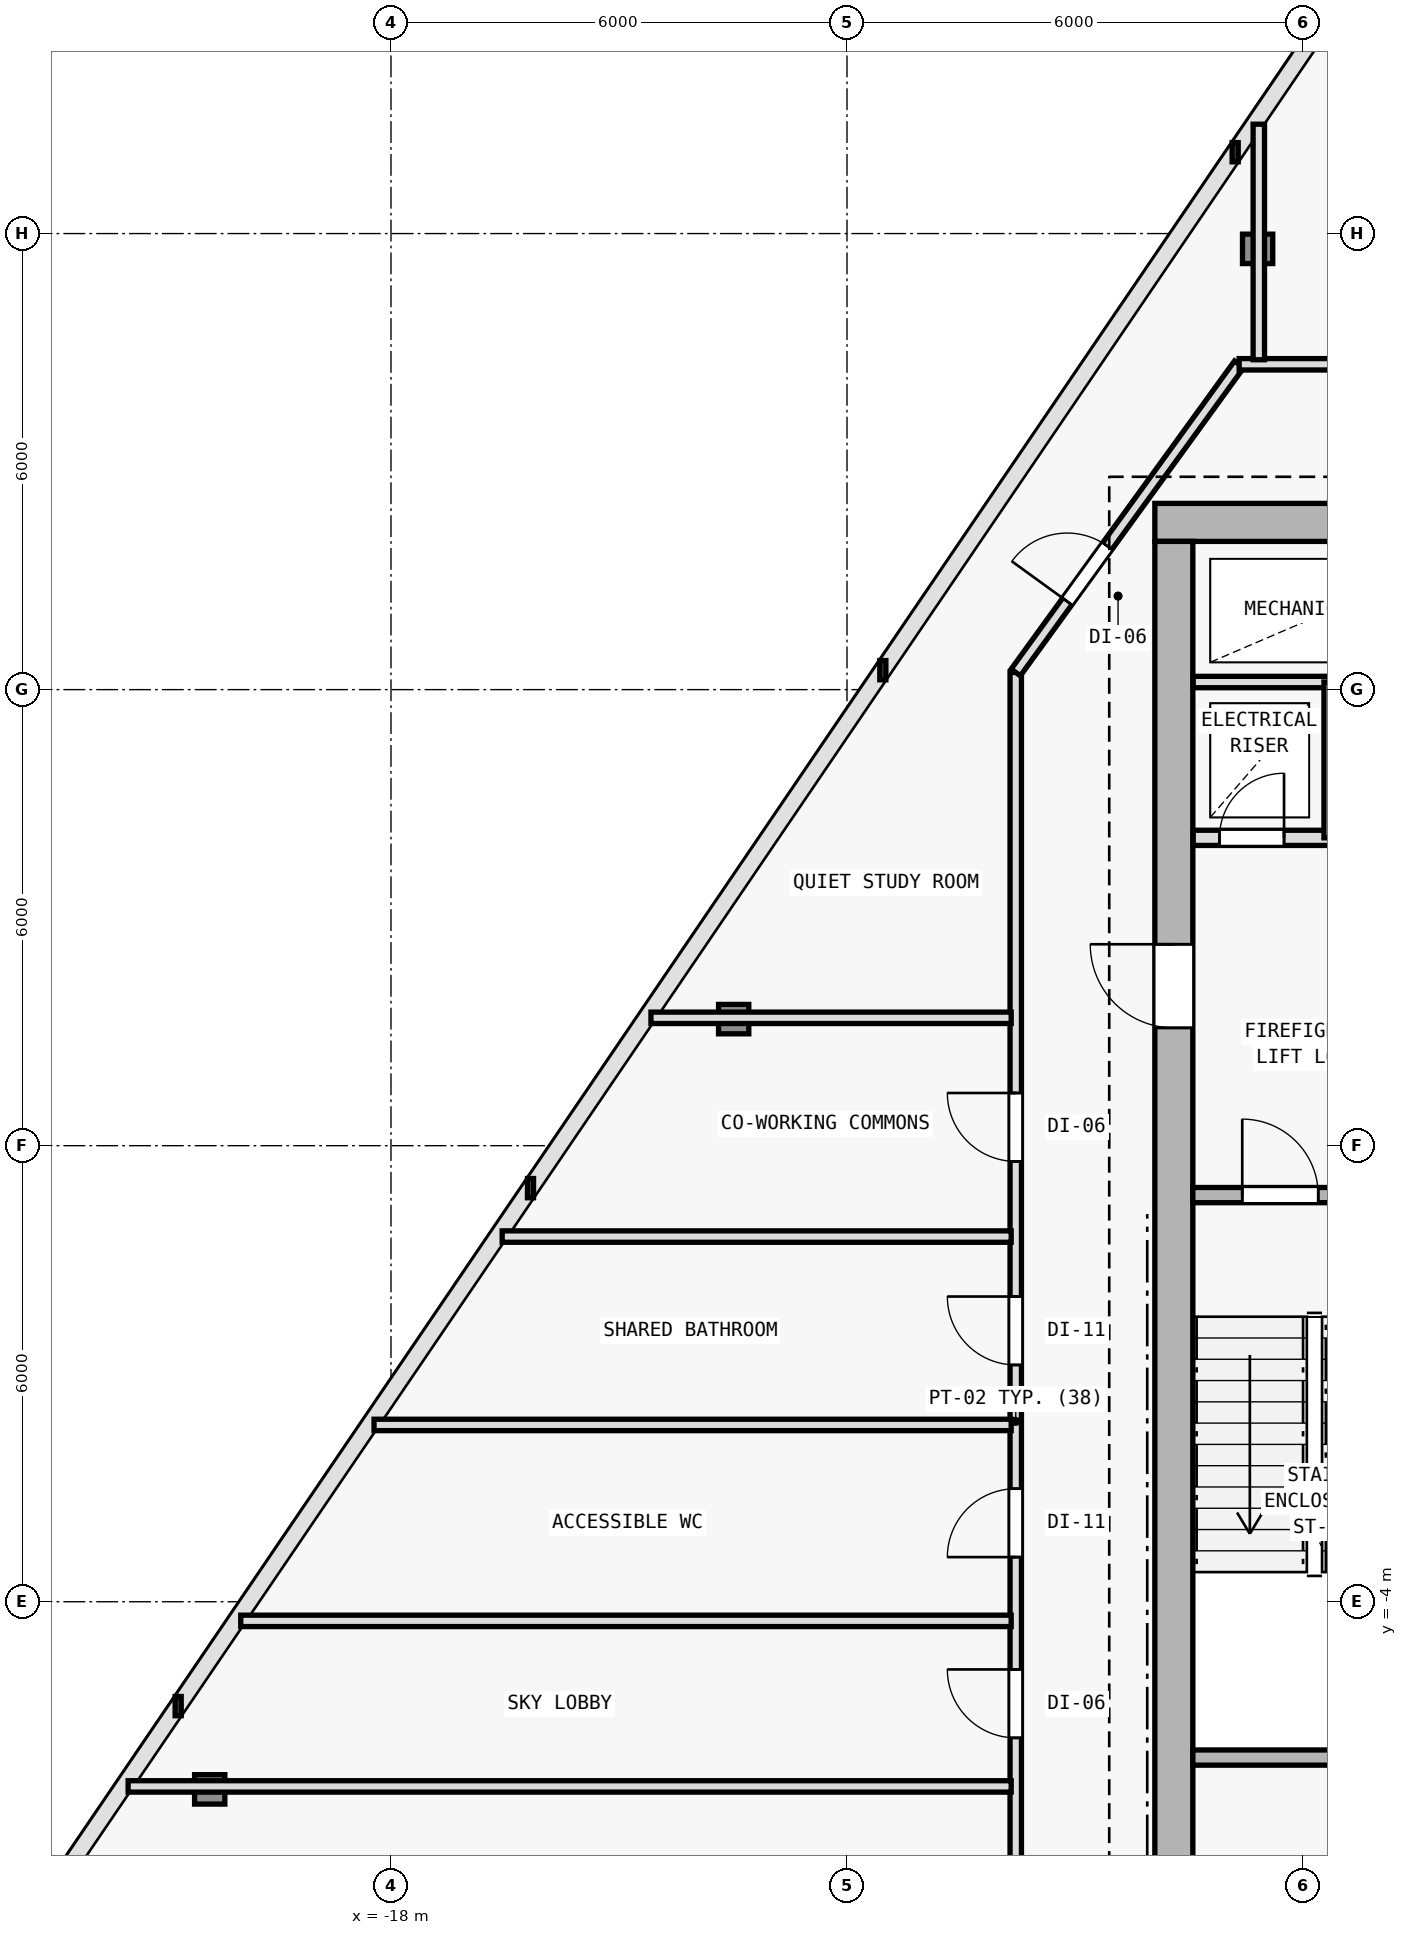
"""IFC4 building model, lengths in metres.
Left out: names, types, materials, properties, quantities, classifications, styles, units other than length and angle.
Written with IfcOpenShell. Run it as: python <this file> out.ifc"""

import sys

from ifc_helpers import new_model, si_unit, direction, frame, frame_2d, origin, origin_2d, place, context, subcontext, project, spatial, rectangle, i_section, extrude, element, fill, save


model = new_model("IFC4")
c1 = context("Model", 3, precision=1e-05, world=origin(), true_north=direction((0.0, 1.0)))
c2 = subcontext(c1, "Body", "Model", "MODEL_VIEW")
j1 = project(units=[si_unit("LENGTHUNIT", "METRE"), si_unit("PLANEANGLEUNIT", "RADIAN")], contexts=[c1])
p1 = place(None, origin())
s1 = spatial("IfcSite", under=j1, at=p1, CompositionType="ELEMENT")
p2 = place(p1, origin())
s2 = spatial("IfcBuilding", under=s1, at=p2, CompositionType="ELEMENT")
p3 = place(p2, frame((0.0, 0.0, 190.2)))
s3 = spatial("IfcBuildingStorey", under=s2, at=p3, CompositionType="ELEMENT", Elevation=190.2)
for number, where, z_axis, x_axis in (
    (1, (-7.7, 10.2, 0.0), (0.0, 0.0, 1.0), (1.0, 0.0, 0.0)),
    (2, (-7.7, 2.0, 0.0), (0.0, 0.0, 1.0), (1.0, 0.0, 0.0)),
):
    element("IfcColumn", number, at=place(p3, frame(where, z_axis=z_axis, x_axis=x_axis)), inside=s3, PredefinedType="COLUMN", context=c2, shape_type="SweptSolid", body=[
        extrude(i_section(OverallWidth=0.404, OverallDepth=0.407, WebThickness=0.017, FlangeThickness=0.028, FilletRadius=0.015, at=origin_2d()), origin(), (0.0, 0.0, 1.0), 4.5),
    ])
p4 = place(p3, frame((-6.598, 13.799, 0.006), z_axis=(0.007015639536, -0.002012237696, 0.999973365496), x_axis=(0.275705143097, 0.961242255662, 0.0)))
e3 = element("IfcColumn", 3, at=p4, inside=s3, PredefinedType="COLUMN", context=c2, shape_type="SweptSolid", body=[
    extrude(i_section(OverallWidth=0.398, OverallDepth=0.387, WebThickness=0.013, FlangeThickness=0.022, FilletRadius=0.015, at=origin_2d()), origin(), (0.0, 0.0, 1.0), 4.489),
])
p5 = place(p3, frame((-13.491, 3.665, 0.006), z_axis=(0.013540536906, 0.007667532947, 0.99987892407), x_axis=(-0.492748024369, 0.870172043035, 0.0)))
e4 = element("IfcColumn", 4, at=p5, inside=s3, PredefinedType="COLUMN", context=c2, shape_type="SweptSolid", body=[
    extrude(i_section(OverallWidth=0.398, OverallDepth=0.387, WebThickness=0.013, FlangeThickness=0.022, FilletRadius=0.015, at=origin_2d()), origin(), (0.0, 0.0, 1.0), 4.49),
])
p6 = place(p3, frame((-20.385, -6.469, 0.006), z_axis=(0.020170177998, 0.017288723999, 0.999647069691), x_axis=(-0.650791373456, 0.759256602365, 0.0)))
e5 = element("IfcColumn", 5, at=p6, inside=s3, PredefinedType="COLUMN", context=c2, shape_type="SweptSolid", body=[
    extrude(i_section(OverallWidth=0.398, OverallDepth=0.387, WebThickness=0.013, FlangeThickness=0.022, FilletRadius=0.015, at=origin_2d()), origin(), (0.0, 0.0, 1.0), 4.49),
])
p7 = place(p3, frame((7.95, 10.2, 0.0), z_axis=(0.0, 0.0, 1.0), x_axis=(-1.0, 0.0, 0.0)))
e6 = element("IfcWall", 6, at=p7, inside=s3, PredefinedType="SHEAR", context=c2, shape_type="SweptSolid", body=[
    extrude(rectangle(XDim=15.9, YDim=0.5, at=frame_2d((7.95, 0.0))), origin(), (0.0, 0.0, 1.0), 4.25),
])
p8 = place(p7, frame((4.4, 0.0, 0.0)))
e7 = element("IfcOpeningElement", 7, at=p8, cuts=e6, PredefinedType="OPENING", context=c2, shape_type="SweptSolid", body=[
    extrude(rectangle(XDim=1.1, YDim=2.15, at=frame_2d((0.55, 1.075))), frame((0.0, 0.26, 0.0), z_axis=(0.0, -1.0, 0.0), x_axis=(1.0, 0.0, 0.0)), (0.0, 0.0, 1.0), 0.52),
])
p9 = place(p3, frame((-7.7, -9.15, 0.0), z_axis=(0.0, 0.0, 1.0), x_axis=(0.0, 1.0, 0.0)))
e8 = element("IfcWall", 8, at=p9, inside=s3, PredefinedType="SHEAR", context=c2, shape_type="SweptSolid", body=[
    extrude(rectangle(XDim=19.1, YDim=0.5, at=frame_2d((9.55, 0.0))), origin(), (0.0, 0.0, 1.0), 4.25),
])
p10 = place(p9, frame((12.7, 0.0, 0.0)))
e9 = element("IfcOpeningElement", 9, at=p10, cuts=e8, PredefinedType="OPENING", context=c2, shape_type="SweptSolid", body=[
    extrude(rectangle(XDim=1.1, YDim=2.15, at=frame_2d((0.55, 1.075))), frame((0.0, 0.26, 0.0), z_axis=(0.0, -1.0, 0.0), x_axis=(1.0, 0.0, 0.0)), (0.0, 0.0, 1.0), 0.52),
])
p11 = place(p3, frame((-7.45, 1.35, 0.0), z_axis=(0.0, 0.0, 1.0), x_axis=(1.0, 0.0, 0.0)))
e10 = element("IfcWall", 10, at=p11, inside=s3, PredefinedType="SOLIDWALL", context=c2, shape_type="SweptSolid", body=[
    extrude(rectangle(XDim=3.4, YDim=0.2, at=frame_2d((1.7, 0.0))), origin(), (0.0, 0.0, 1.0), 4.25),
])
p12 = place(p11, frame((0.65, 0.0, 0.0)))
e11 = element("IfcOpeningElement", 11, at=p12, cuts=e10, PredefinedType="OPENING", context=c2, shape_type="SweptSolid", body=[
    extrude(rectangle(XDim=1.0, YDim=2.15, at=frame_2d((0.5, 1.075))), frame((0.0, 0.11, 0.0), z_axis=(0.0, -1.0, 0.0), x_axis=(1.0, 0.0, 0.0)), (0.0, 0.0, 1.0), 0.22),
])
p13 = place(p3, frame((-7.445, 6.05, 0.0), z_axis=(0.0, 0.0, 1.0), x_axis=(1.0, 0.0, 0.0)))
e12 = element("IfcWall", 12, at=p13, inside=s3, PredefinedType="SOLIDWALL", context=c2, shape_type="SweptSolid", body=[
    extrude(rectangle(XDim=3.595, YDim=0.2, at=frame_2d((1.797, 0.0))), origin(), (0.0, 0.0, 1.0), 4.25),
])
p14 = place(p13, frame((0.345, 0.0, 0.0)))
e13 = element("IfcOpeningElement", 13, at=p14, cuts=e12, PredefinedType="OPENING", context=c2, shape_type="SweptSolid", body=[
    extrude(rectangle(XDim=0.85, YDim=2.1, at=frame_2d((0.425, 1.05))), frame((0.0, 0.11, 0.0), z_axis=(0.0, -1.0, 0.0), x_axis=(1.0, 0.0, 0.0)), (0.0, 0.0, 1.0), 0.22),
])
p15 = place(p13, frame((2.145, 0.0, 0.0)))
e14 = element("IfcOpeningElement", 14, at=p15, cuts=e12, PredefinedType="OPENING", context=c2, shape_type="SweptSolid", body=[
    extrude(rectangle(XDim=0.85, YDim=2.1, at=frame_2d((0.425, 1.05))), frame((0.0, 0.11, 0.0), z_axis=(0.0, -1.0, 0.0), x_axis=(1.0, 0.0, 0.0)), (0.0, 0.0, 1.0), 0.22),
])
p16 = place(p3, frame((-7.445, 8.1, 0.0), z_axis=(0.0, 0.0, 1.0), x_axis=(1.0, 0.0, 0.0)))
e15 = element("IfcWall", 15, at=p16, inside=s3, PredefinedType="PARTITIONING", context=c2, shape_type="SweptSolid", body=[
    extrude(rectangle(XDim=3.595, YDim=0.15, at=frame_2d((1.797, 0.0))), origin(), (0.0, 0.0, 1.0), 4.25),
])
p17 = place(p3, frame((-5.65, 6.05, 0.0), z_axis=(0.0, 0.0, 1.0), x_axis=(0.0, 1.0, 0.0)))
e16 = element("IfcWall", 16, at=p17, inside=s3, PredefinedType="PARTITIONING", context=c2, shape_type="SweptSolid", body=[
    extrude(rectangle(XDim=2.05, YDim=0.15, at=frame_2d((1.025, 0.0))), origin(), (0.0, 0.0, 1.0), 4.25),
])
p18 = place(p3, frame((-7.45, -6.05, 0.0), z_axis=(0.0, 0.0, 1.0), x_axis=(1.0, 0.0, 0.0)))
e17 = element("IfcWall", 17, at=p18, inside=s3, PredefinedType="SOLIDWALL", context=c2, shape_type="SweptSolid", body=[
    extrude(rectangle(XDim=3.4, YDim=0.2, at=frame_2d((1.7, 0.0))), origin(), (0.0, 0.0, 1.0), 4.25),
])
p19 = place(p3, frame((-9.78, -11.48, 0.0), z_axis=(0.0, 0.0, 1.0), x_axis=(0.0, 1.0, 0.0)))
e18 = element("IfcWall", 18, at=p19, inside=s3, PredefinedType="PARTITIONING", context=c2, shape_type="SweptSolid", body=[
    extrude(rectangle(XDim=19.706, YDim=0.15, at=frame_2d((9.853, 0.0))), origin(), (0.0, 0.0, 1.0), 3.725),
])
p20 = place(p19, frame((10.595, 0.0, 0.0)))
e19 = element("IfcOpeningElement", 19, at=p20, cuts=e18, PredefinedType="OPENING", context=c2, shape_type="SweptSolid", body=[
    extrude(rectangle(XDim=0.9, YDim=2.1, at=frame_2d((0.45, 1.05))), frame((0.0, 0.085, 0.0), z_axis=(0.0, -1.0, 0.0), x_axis=(1.0, 0.0, 0.0)), (0.0, 0.0, 1.0), 0.17),
])
p21 = place(p19, frame((8.067, 0.0, 0.0)))
e20 = element("IfcOpeningElement", 20, at=p21, cuts=e18, PredefinedType="OPENING", context=c2, shape_type="SweptSolid", body=[
    extrude(rectangle(XDim=0.9, YDim=2.1, at=frame_2d((0.45, 1.05))), frame((0.0, 0.085, 0.0), z_axis=(0.0, -1.0, 0.0), x_axis=(1.0, 0.0, 0.0)), (0.0, 0.0, 1.0), 0.17),
])
p22 = place(p19, frame((5.689, 0.0, 0.0)))
e21 = element("IfcOpeningElement", 21, at=p22, cuts=e18, PredefinedType="OPENING", context=c2, shape_type="SweptSolid", body=[
    extrude(rectangle(XDim=0.9, YDim=2.1, at=frame_2d((0.45, 1.05))), frame((0.0, 0.085, 0.0), z_axis=(0.0, -1.0, 0.0), x_axis=(1.0, 0.0, 0.0)), (0.0, 0.0, 1.0), 0.17),
])
p23 = place(p19, frame((2.164, 0.0, 0.0)))
e22 = element("IfcOpeningElement", 22, at=p23, cuts=e18, PredefinedType="OPENING", context=c2, shape_type="SweptSolid", body=[
    extrude(rectangle(XDim=0.9, YDim=2.1, at=frame_2d((0.45, 1.05))), frame((0.0, 0.085, 0.0), z_axis=(0.0, -1.0, 0.0), x_axis=(1.0, 0.0, 0.0)), (0.0, 0.0, 1.0), 0.17),
])
p24 = place(p19, frame((13.273, 0.0, 0.0)))
e23 = element("IfcOpeningElement", 23, at=p24, cuts=e18, PredefinedType="OPENING", context=c2, shape_type="SweptSolid", body=[
    extrude(rectangle(XDim=0.9, YDim=2.1, at=frame_2d((0.45, 1.05))), frame((0.0, 0.085, 0.0), z_axis=(0.0, -1.0, 0.0), x_axis=(1.0, 0.0, 0.0)), (0.0, 0.0, 1.0), 0.17),
])
p25 = place(p3, frame((-9.78, 8.226, 0.0), z_axis=(0.0, 0.0, 1.0), x_axis=(0.586956386413, 0.809618552436, 0.0)))
e24 = element("IfcWall", 24, at=p25, inside=s3, PredefinedType="PARTITIONING", context=c2, shape_type="SweptSolid", body=[
    extrude(rectangle(XDim=5.008, YDim=0.15, at=frame_2d((2.504, 0.0))), origin(), (0.0, 0.0, 1.0), 3.905),
])
p26 = place(p25, frame((1.154, 0.0, 0.0)))
e25 = element("IfcOpeningElement", 25, at=p26, cuts=e24, PredefinedType="OPENING", context=c2, shape_type="SweptSolid", body=[
    extrude(rectangle(XDim=0.9, YDim=2.1, at=frame_2d((0.45, 1.05))), frame((0.0, 0.085, 0.0), z_axis=(0.0, -1.0, 0.0), x_axis=(1.0, 0.0, 0.0)), (0.0, 0.0, 1.0), 0.17),
])
p27 = place(p3, frame((-6.841, 12.28, 0.0), z_axis=(0.0, 0.0, 1.0), x_axis=(1.0, 0.0, 0.0)))
e26 = element("IfcWall", 26, at=p27, inside=s3, PredefinedType="PARTITIONING", context=c2, shape_type="SweptSolid", body=[
    extrude(rectangle(XDim=13.682, YDim=0.15, at=frame_2d((6.841, 0.0))), origin(), (0.0, 0.0, 1.0), 3.905),
])
p28 = place(p27, frame((11.723, 0.0, 0.0)))
e27 = element("IfcOpeningElement", 27, at=p28, cuts=e26, PredefinedType="OPENING", context=c2, shape_type="SweptSolid", body=[
    extrude(rectangle(XDim=0.9, YDim=2.1, at=frame_2d((0.45, 1.05))), frame((0.0, 0.085, 0.0), z_axis=(0.0, -1.0, 0.0), x_axis=(1.0, 0.0, 0.0)), (0.0, 0.0, 1.0), 0.17),
])
p29 = place(p27, frame((8.712, 0.0, 0.0)))
e28 = element("IfcOpeningElement", 28, at=p29, cuts=e26, PredefinedType="OPENING", context=c2, shape_type="SweptSolid", body=[
    extrude(rectangle(XDim=0.9, YDim=2.1, at=frame_2d((0.45, 1.05))), frame((0.0, 0.085, 0.0), z_axis=(0.0, -1.0, 0.0), x_axis=(1.0, 0.0, 0.0)), (0.0, 0.0, 1.0), 0.17),
])
p30 = place(p27, frame((6.014, 0.0, 0.0)))
e29 = element("IfcOpeningElement", 29, at=p30, cuts=e26, PredefinedType="OPENING", context=c2, shape_type="SweptSolid", body=[
    extrude(rectangle(XDim=0.9, YDim=2.1, at=frame_2d((0.45, 1.05))), frame((0.0, 0.085, 0.0), z_axis=(0.0, -1.0, 0.0), x_axis=(1.0, 0.0, 0.0)), (0.0, 0.0, 1.0), 0.17),
])
p31 = place(p27, frame((2.403, 0.0, 0.0)))
e30 = element("IfcOpeningElement", 30, at=p31, cuts=e26, PredefinedType="OPENING", context=c2, shape_type="SweptSolid", body=[
    extrude(rectangle(XDim=0.9, YDim=2.1, at=frame_2d((0.45, 1.05))), frame((0.0, 0.085, 0.0), z_axis=(0.0, -1.0, 0.0), x_axis=(1.0, 0.0, 0.0)), (0.0, 0.0, 1.0), 0.17),
])
p32 = place(p3, frame((-6.582, 12.34, 0.0), z_axis=(0.0, 0.0, 1.0), x_axis=(0.0, 1.0, 0.0)))
e31 = element("IfcWall", 31, at=p32, inside=s3, PredefinedType="PARTITIONING", context=c2, shape_type="SweptSolid", body=[
    extrude(rectangle(XDim=3.099, YDim=0.15, at=frame_2d((1.549, 0.0))), origin(), (0.0, 0.0, 1.0), 3.835),
])
p33 = place(p3, frame((-9.84, 3.682, 0.0), z_axis=(0.0, 0.0, 1.0), x_axis=(-1.0, 0.0, 0.0)))
e32 = element("IfcWall", 32, at=p33, inside=s3, PredefinedType="PARTITIONING", context=c2, shape_type="SweptSolid", body=[
    extrude(rectangle(XDim=4.74, YDim=0.15, at=frame_2d((2.37, 0.0))), origin(), (0.0, 0.0, 1.0), 3.835),
])
p34 = place(p3, frame((-9.84, -6.43, 0.0), z_axis=(0.0, 0.0, 1.0), x_axis=(-1.0, 0.0, 0.0)))
e33 = element("IfcWall", 33, at=p34, inside=s3, PredefinedType="PARTITIONING", context=c2, shape_type="SweptSolid", body=[
    extrude(rectangle(XDim=11.618, YDim=0.15, at=frame_2d((5.809, 0.0))), origin(), (0.0, 0.0, 1.0), 3.725),
])
p35 = place(p3, frame((-9.84, -1.674, 0.0), z_axis=(0.0, 0.0, 1.0), x_axis=(-1.0, 0.0, 0.0)))
e34 = element("IfcWall", 34, at=p35, inside=s3, PredefinedType="PARTITIONING", context=c2, shape_type="SweptSolid", body=[
    extrude(rectangle(XDim=8.383, YDim=0.15, at=frame_2d((4.191, 0.0))), origin(), (0.0, 0.0, 1.0), 3.835),
])
p36 = place(p3, frame((-9.84, -4.252, 0.0), z_axis=(0.0, 0.0, 1.0), x_axis=(-1.0, 0.0, 0.0)))
e35 = element("IfcWall", 35, at=p36, inside=s3, PredefinedType="PARTITIONING", context=c2, shape_type="SweptSolid", body=[
    extrude(rectangle(XDim=10.137, YDim=0.15, at=frame_2d((5.068, 0.0))), origin(), (0.0, 0.0, 1.0), 3.835),
])
p37 = place(p3, frame((-9.84, 0.804, 0.0), z_axis=(0.0, 0.0, 1.0), x_axis=(-1.0, 0.0, 0.0)))
e36 = element("IfcWall", 36, at=p37, inside=s3, PredefinedType="PARTITIONING", context=c2, shape_type="SweptSolid", body=[
    extrude(rectangle(XDim=6.697, YDim=0.15, at=frame_2d((3.349, 0.0))), origin(), (0.0, 0.0, 1.0), 3.835),
])
p38 = place(p10, origin())
e37 = element("IfcDoor", 37, at=p38, inside=s3, OperationType="SINGLE_SWING_RIGHT", PredefinedType="DOOR", context=c2, shape_type="SweptSolid", body=[
    extrude(rectangle(XDim=1.1, YDim=2.15, at=frame_2d((0.55, 1.075))), frame((0.0, 0.025, 0.0), z_axis=(0.0, -1.0, 0.0), x_axis=(1.0, 0.0, 0.0)), (0.0, 0.0, 1.0), 0.05),
])
fill(e9, e37)
p39 = place(p12, origin())
e38 = element("IfcDoor", 38, at=p39, inside=s3, OperationType="SINGLE_SWING_LEFT", PredefinedType="DOOR", context=c2, shape_type="SweptSolid", body=[
    extrude(rectangle(XDim=1.0, YDim=2.15, at=frame_2d((0.5, 1.075))), frame((0.0, 0.025, 0.0), z_axis=(0.0, -1.0, 0.0), x_axis=(1.0, 0.0, 0.0)), (0.0, 0.0, 1.0), 0.05),
])
fill(e11, e38)
p40 = place(p14, origin())
e39 = element("IfcDoor", 39, at=p40, inside=s3, OperationType="SINGLE_SWING_RIGHT", PredefinedType="DOOR", context=c2, shape_type="SweptSolid", body=[
    extrude(rectangle(XDim=0.85, YDim=2.1, at=frame_2d((0.425, 1.05))), frame((0.0, 0.025, 0.0), z_axis=(0.0, -1.0, 0.0), x_axis=(1.0, 0.0, 0.0)), (0.0, 0.0, 1.0), 0.05),
])
fill(e13, e39)
p41 = place(p20, origin())
e40 = element("IfcDoor", 40, at=p41, inside=s3, OperationType="SINGLE_SWING_RIGHT", PredefinedType="DOOR", context=c2, shape_type="SweptSolid", body=[
    extrude(rectangle(XDim=0.9, YDim=2.1, at=frame_2d((0.45, 1.05))), frame((0.0, 0.025, 0.0), z_axis=(0.0, -1.0, 0.0), x_axis=(1.0, 0.0, 0.0)), (0.0, 0.0, 1.0), 0.05),
])
fill(e19, e40)
p42 = place(p21, origin())
e41 = element("IfcDoor", 41, at=p42, inside=s3, OperationType="SINGLE_SWING_LEFT", PredefinedType="DOOR", context=c2, shape_type="SweptSolid", body=[
    extrude(rectangle(XDim=0.9, YDim=2.1, at=frame_2d((0.45, 1.05))), frame((0.0, 0.025, 0.0), z_axis=(0.0, -1.0, 0.0), x_axis=(1.0, 0.0, 0.0)), (0.0, 0.0, 1.0), 0.05),
])
fill(e20, e41)
p43 = place(p22, origin())
e42 = element("IfcDoor", 42, at=p43, inside=s3, OperationType="SINGLE_SWING_RIGHT", PredefinedType="DOOR", context=c2, shape_type="SweptSolid", body=[
    extrude(rectangle(XDim=0.9, YDim=2.1, at=frame_2d((0.45, 1.05))), frame((0.0, 0.025, 0.0), z_axis=(0.0, -1.0, 0.0), x_axis=(1.0, 0.0, 0.0)), (0.0, 0.0, 1.0), 0.05),
])
fill(e21, e42)
p44 = place(p26, origin())
e43 = element("IfcDoor", 43, at=p44, inside=s3, OperationType="SINGLE_SWING_LEFT", PredefinedType="DOOR", context=c2, shape_type="SweptSolid", body=[
    extrude(rectangle(XDim=0.9, YDim=2.1, at=frame_2d((0.45, 1.05))), frame((0.0, 0.025, 0.0), z_axis=(0.0, -1.0, 0.0), x_axis=(1.0, 0.0, 0.0)), (0.0, 0.0, 1.0), 0.05),
])
fill(e25, e43)
p45 = place(p24, origin())
e44 = element("IfcDoor", 44, at=p45, inside=s3, OperationType="SINGLE_SWING_RIGHT", PredefinedType="DOOR", context=c2, shape_type="SweptSolid", body=[
    extrude(rectangle(XDim=0.9, YDim=2.1, at=frame_2d((0.45, 1.05))), frame((0.0, 0.025, 0.0), z_axis=(0.0, -1.0, 0.0), x_axis=(1.0, 0.0, 0.0)), (0.0, 0.0, 1.0), 0.05),
])
fill(e23, e44)
save(model, sys.argv[1])
